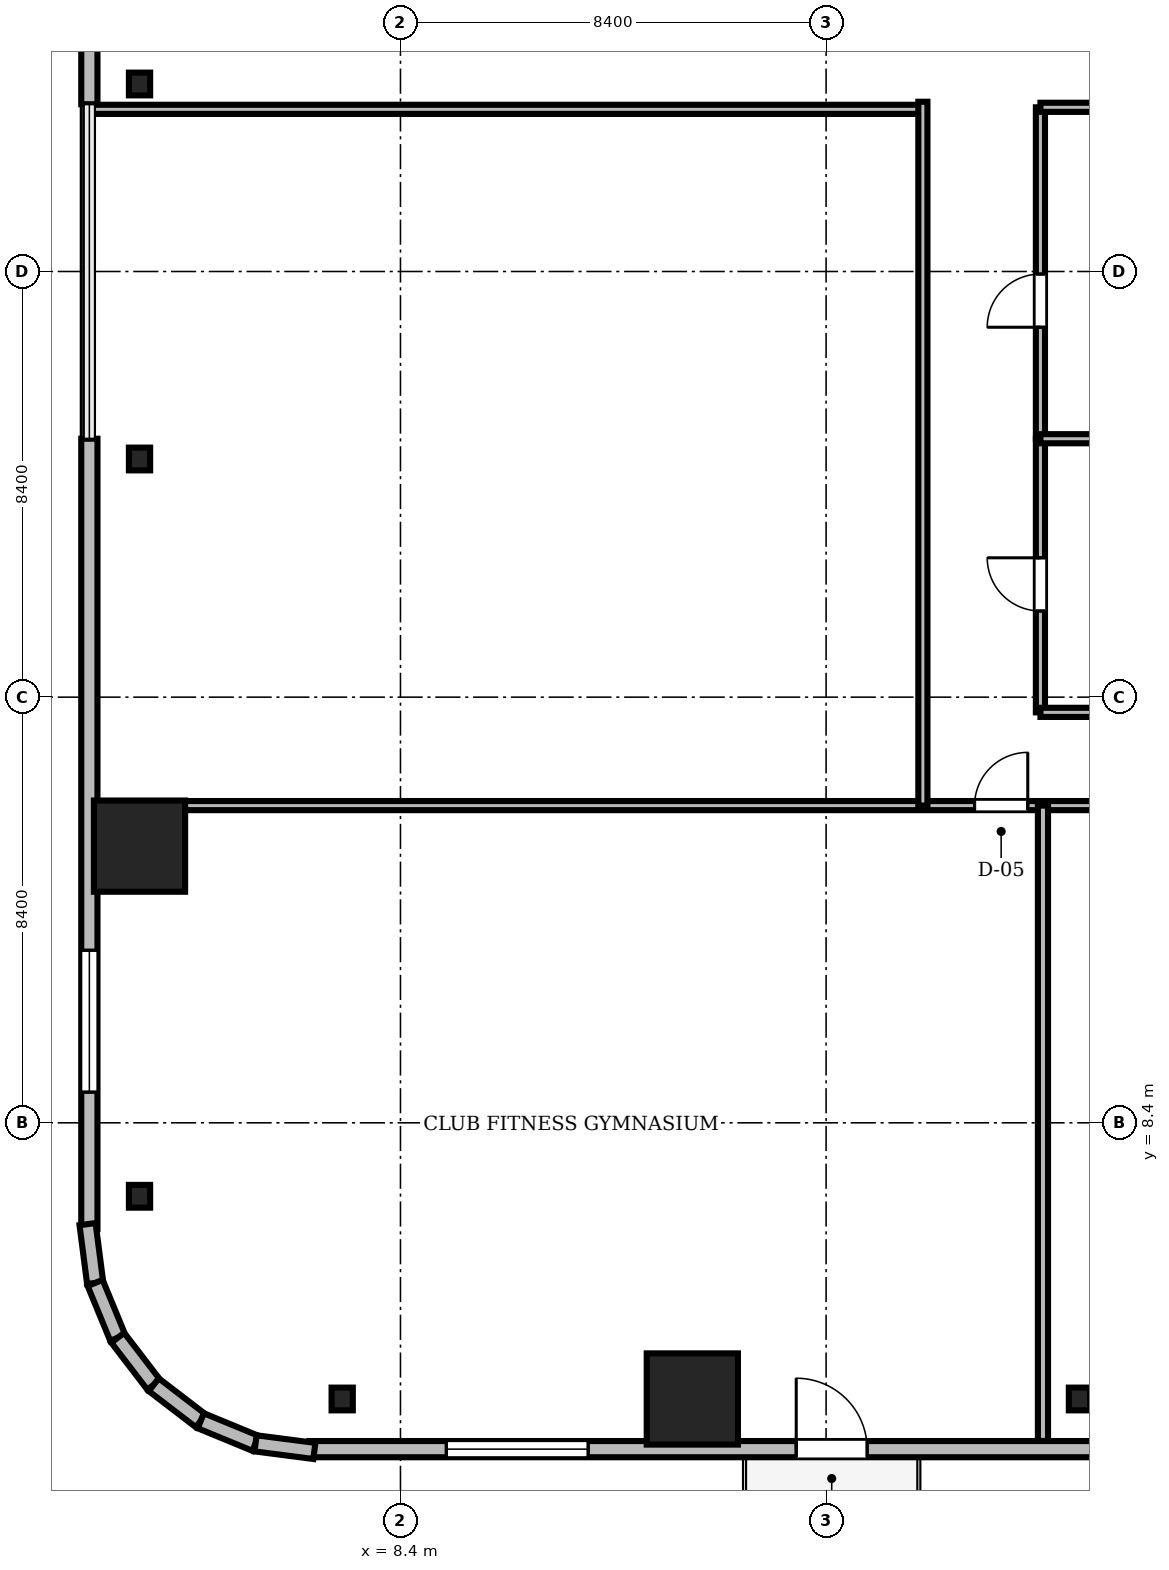
"""IFC4 building model, lengths in metres.
Left out: names, types, materials, properties, quantities, classifications, styles, units other than length and angle.
Written with IfcOpenShell. Run it as: python <this file> out.ifc"""

import sys

from ifc_helpers import new_model, si_unit, direction, frame, frame_2d, origin, origin_2d, place, context, subcontext, project, spatial, rectangle, i_section, extrude, source, transform, mapped, element, fill, save


model = new_model("IFC4")
c1 = context("Model", 3, precision=1e-05, world=origin(), true_north=direction((0.0, 1.0)))
c2 = subcontext(c1, "Body", "Model", "MODEL_VIEW")
j1 = project(units=[si_unit("LENGTHUNIT", "METRE"), si_unit("PLANEANGLEUNIT", "RADIAN")], contexts=[c1])
p1 = place(None, origin())
s1 = spatial("IfcSite", under=j1, at=p1, CompositionType="ELEMENT")
p2 = place(p1, origin())
s2 = spatial("IfcBuilding", under=s1, at=p2, CompositionType="ELEMENT")
p3 = place(p2, frame((0.0, 0.0, 64.1)))
s3 = spatial("IfcBuildingStorey", under=s2, at=p3, CompositionType="ELEMENT", Elevation=64.1)
m1 = source(origin(), c2, "Body", "SweptSolid", [
    extrude(rectangle(XDim=1.8, YDim=1.8, at=origin_2d()), origin(), (0.0, 0.0, 1.0), 3.41),
])
for number, where, z_axis, x_axis in (
    (1, (14.16, 2.95, 0.0), (0.0, 0.0, 1.0), (1.0, 0.0, 0.0)),
    (2, (3.25, 13.86, 0.0), (0.0, 0.0, 1.0), (1.0, 0.0, 0.0)),
):
    element("IfcColumn", number, at=place(p3, frame(where, z_axis=z_axis, x_axis=x_axis)), inside=s3, PredefinedType="COLUMN", context=c2, shape_type="MappedRepresentation", body=[
        mapped(m1, transform((0.0, 0.0, 0.0), scale=1.0)),
    ])
m2 = source(origin(), c2, "Body", "SweptSolid", [
    extrude(i_section(OverallWidth=0.419, OverallDepth=0.449, WebThickness=0.031, FlangeThickness=0.048, FilletRadius=0.015, at=origin_2d()), origin(), (0.0, 0.0, 1.0), 3.41),
])
for number, where, z_axis, x_axis in (
    (3, (7.25, 2.95, 0.0), (0.0, 0.0, 1.0), (1.0, 0.0, 0.0)),
    (4, (21.8, 2.95, 0.0), (0.0, 0.0, 1.0), (1.0, 0.0, 0.0)),
    (5, (3.25, 28.9, 0.0), (0.0, 0.0, 1.0), (1.0, 0.0, 0.0)),
    (6, (3.25, 21.5, 0.0), (0.0, 0.0, 1.0), (1.0, 0.0, 0.0)),
    (7, (3.25, 6.95, 0.0), (0.0, 0.0, 1.0), (1.0, 0.0, 0.0)),
):
    element("IfcColumn", number, at=place(p3, frame(where, z_axis=z_axis, x_axis=x_axis)), inside=s3, PredefinedType="COLUMN", context=c2, shape_type="MappedRepresentation", body=[
        mapped(m2, transform((0.0, 0.0, 0.0), scale=1.0)),
    ])
m3 = source(origin(), c2, "Body", "SweptSolid", [
    extrude(rectangle(XDim=15.6, YDim=0.32, at=frame_2d((7.8, 0.0))), origin(), (0.0, 0.0, 1.0), 3.41),
])
p4 = place(p3, frame((6.6, 1.96, 0.0), z_axis=(0.0, 0.0, 1.0), x_axis=(1.0, 0.0, 0.0)))
e8 = element("IfcWall", 8, at=p4, inside=s3, PredefinedType="SOLIDWALL", context=c2, shape_type="MappedRepresentation", body=[
    mapped(m3, transform((0.0, 0.0, 0.0), scale=1.0)),
])
m4 = source(origin(), c2, "Body", "SweptSolid", [
    extrude(rectangle(XDim=1.4, YDim=2.3, at=frame_2d((0.7, 1.15))), frame((0.0, 0.17, 0.0), z_axis=(0.0, -1.0, 0.0), x_axis=(1.0, 0.0, 0.0)), (0.0, 0.0, 1.0), 0.34),
])
p5 = place(p4, frame((9.61, 0.0, 0.0)))
e9 = element("IfcOpeningElement", 9, at=p5, cuts=e8, PredefinedType="OPENING", context=c2, shape_type="MappedRepresentation", body=[
    mapped(m4, transform((0.0, 0.0, 0.0), scale=1.0)),
])
m5 = source(origin(), c2, "Body", "SweptSolid", [
    extrude(rectangle(XDim=2.8, YDim=2.4, at=frame_2d((1.4, 1.2))), frame((0.0, 0.17, 0.0), z_axis=(0.0, -1.0, 0.0), x_axis=(1.0, 0.0, 0.0)), (0.0, 0.0, 1.0), 0.34),
])
p6 = place(p4, frame((2.705, 0.0, 0.72)))
e10 = element("IfcOpeningElement", 10, at=p6, cuts=e8, PredefinedType="OPENING", context=c2, shape_type="MappedRepresentation", body=[
    mapped(m5, transform((0.0, 0.0, 0.0), scale=1.0)),
])
m6 = source(origin(), c2, "Body", "SweptSolid", [
    extrude(rectangle(XDim=15.6, YDim=0.32, at=frame_2d((7.8, 0.0))), origin(), (0.0, 0.0, 1.0), 3.41),
])
p7 = place(p3, frame((2.26, 44.1, 0.0), z_axis=(0.0, 0.0, 1.0), x_axis=(0.0, -1.0, 0.0)))
e11 = element("IfcWall", 11, at=p7, inside=s3, PredefinedType="SOLIDWALL", context=c2, shape_type="MappedRepresentation", body=[
    mapped(m6, transform((0.0, 0.0, 0.0), scale=1.0)),
])
p8 = place(p7, frame((9.61, 0.0, 0.0)))
e12 = element("IfcOpeningElement", 12, at=p8, cuts=e11, PredefinedType="OPENING", context=c2, shape_type="MappedRepresentation", body=[
    mapped(m4, transform((0.0, 0.0, 0.0), scale=1.0)),
])
p9 = place(p7, frame((2.705, 0.0, 0.72)))
e13 = element("IfcOpeningElement", 13, at=p9, cuts=e11, PredefinedType="OPENING", context=c2, shape_type="MappedRepresentation", body=[
    mapped(m5, transform((0.0, 0.0, 0.0), scale=1.0)),
])
p10 = place(p3, frame((2.26, 21.9, 0.0), z_axis=(0.0, 0.0, 1.0), x_axis=(0.0, -1.0, 0.0)))
e14 = element("IfcWall", 14, at=p10, inside=s3, PredefinedType="SOLIDWALL", context=c2, shape_type="MappedRepresentation", body=[
    mapped(m3, transform((0.0, 0.0, 0.0), scale=1.0)),
])
p11 = place(p10, frame((10.095, 0.0, 0.72)))
e15 = element("IfcOpeningElement", 15, at=p11, cuts=e14, PredefinedType="OPENING", context=c2, shape_type="MappedRepresentation", body=[
    mapped(m5, transform((0.0, 0.0, 0.0), scale=1.0)),
])
m7 = source(origin(), c2, "Body", "SweptSolid", [
    extrude(rectangle(XDim=1.171, YDim=0.32, at=frame_2d((0.585, 0.0))), origin(), (0.0, 0.0, 1.0), 3.41),
])
p12 = place(p3, frame((2.224, 6.401, 0.0), z_axis=(0.0, 0.0, 1.0), x_axis=(0.128269133229, -0.991739395941, 0.0)))
e16 = element("IfcWall", 16, at=p12, inside=s3, PredefinedType="SOLIDWALL", context=c2, shape_type="MappedRepresentation", body=[
    mapped(m7, transform((0.0, 0.0, 0.0), scale=1.0)),
])
m8 = source(origin(), c2, "Body", "SweptSolid", [
    extrude(rectangle(XDim=1.169, YDim=0.32, at=frame_2d((0.584, 0.0))), origin(), (0.0, 0.0, 1.0), 3.41),
])
for number, where, z_axis, x_axis in (
    (17, (2.375, 5.24, 0.0), (0.0, 0.0, 1.0), (0.381, -0.925, 0.0)),
    (18, (2.82, 4.159, 0.0), (0.0, 0.0, 1.0), (0.608, -0.794, 0.0)),
):
    element("IfcWall", number, at=place(p3, frame(where, z_axis=z_axis, x_axis=x_axis)), inside=s3, PredefinedType="SOLIDWALL", context=c2, shape_type="MappedRepresentation", body=[
        mapped(m8, transform((0.0, 0.0, 0.0), scale=1.0)),
    ])
m9 = source(origin(), c2, "Body", "SweptSolid", [
    extrude(rectangle(XDim=1.169, YDim=0.32, at=frame_2d((0.584, 0.0))), origin(), (0.0, 0.0, 1.0), 3.41),
])
p13 = place(p3, frame((3.531, 3.231, 0.0), z_axis=(0.0, 0.0, 1.0), x_axis=(0.793663520347, -0.608356981114, 0.0)))
e19 = element("IfcWall", 19, at=p13, inside=s3, PredefinedType="SOLIDWALL", context=c2, shape_type="MappedRepresentation", body=[
    mapped(m9, transform((0.0, 0.0, 0.0), scale=1.0)),
])
m10 = source(origin(), c2, "Body", "SweptSolid", [
    extrude(rectangle(XDim=1.169, YDim=0.32, at=frame_2d((0.585, 0.0))), origin(), (0.0, 0.0, 1.0), 3.41),
])
p14 = place(p3, frame((4.459, 2.52, 0.0), z_axis=(0.0, 0.0, 1.0), x_axis=(0.924479075121, -0.381232789334, 0.0)))
e20 = element("IfcWall", 20, at=p14, inside=s3, PredefinedType="SOLIDWALL", context=c2, shape_type="MappedRepresentation", body=[
    mapped(m10, transform((0.0, 0.0, 0.0), scale=1.0)),
])
m11 = source(origin(), c2, "Body", "SweptSolid", [
    extrude(rectangle(XDim=1.17, YDim=0.32, at=frame_2d((0.585, 0.0))), origin(), (0.0, 0.0, 1.0), 3.41),
])
p15 = place(p3, frame((5.54, 2.074, 0.0), z_axis=(0.0, 0.0, 1.0), x_axis=(0.991762485493, -0.128090485085, 0.0)))
e21 = element("IfcWall", 21, at=p15, inside=s3, PredefinedType="SOLIDWALL", context=c2, shape_type="MappedRepresentation", body=[
    mapped(m11, transform((0.0, 0.0, 0.0), scale=1.0)),
])
m12 = source(origin(), c2, "Body", "SweptSolid", [
    extrude(rectangle(XDim=46.156, YDim=0.18, at=frame_2d((23.078, 0.0))), origin(), (0.0, 0.0, 1.0), 2.652),
])
p16 = place(p3, frame((2.422, 14.66, 0.0), z_axis=(0.0, 0.0, 1.0), x_axis=(1.0, 0.0, 0.0)))
e22 = element("IfcWall", 22, at=p16, inside=s3, PredefinedType="PARTITIONING", context=c2, shape_type="MappedRepresentation", body=[
    mapped(m12, transform((0.0, 0.0, 0.0), scale=1.0)),
])
m13 = source(origin(), c2, "Body", "SweptSolid", [
    extrude(rectangle(XDim=1.05, YDim=2.2, at=frame_2d((0.525, 1.1))), frame((0.0, 0.1, 0.0), z_axis=(0.0, -1.0, 0.0), x_axis=(1.0, 0.0, 0.0)), (0.0, 0.0, 1.0), 0.2),
])
p17 = place(p16, frame((17.308, 0.0, 0.0)))
e23 = element("IfcOpeningElement", 23, at=p17, cuts=e22, PredefinedType="OPENING", context=c2, shape_type="MappedRepresentation", body=[
    mapped(m13, transform((0.0, 0.0, 0.0), scale=1.0)),
])
p18 = place(p16, frame((19.947, 0.0, 0.0)))
e24 = element("IfcOpeningElement", 24, at=p18, cuts=e22, PredefinedType="OPENING", context=c2, shape_type="MappedRepresentation", body=[
    mapped(m13, transform((0.0, 0.0, 0.0), scale=1.0)),
])
p19 = place(p16, frame((23.565, 0.0, 0.0)))
e25 = element("IfcOpeningElement", 25, at=p19, cuts=e22, PredefinedType="OPENING", context=c2, shape_type="MappedRepresentation", body=[
    mapped(m13, transform((0.0, 0.0, 0.0), scale=1.0)),
])
p20 = place(p16, frame((27.183, 0.0, 0.0)))
e26 = element("IfcOpeningElement", 26, at=p20, cuts=e22, PredefinedType="OPENING", context=c2, shape_type="MappedRepresentation", body=[
    mapped(m13, transform((0.0, 0.0, 0.0), scale=1.0)),
])
p21 = place(p16, frame((30.801, 0.0, 0.0)))
e27 = element("IfcOpeningElement", 27, at=p21, cuts=e22, PredefinedType="OPENING", context=c2, shape_type="MappedRepresentation", body=[
    mapped(m13, transform((0.0, 0.0, 0.0), scale=1.0)),
])
p22 = place(p16, frame((34.419, 0.0, 0.0)))
e28 = element("IfcOpeningElement", 28, at=p22, cuts=e22, PredefinedType="OPENING", context=c2, shape_type="MappedRepresentation", body=[
    mapped(m13, transform((0.0, 0.0, 0.0), scale=1.0)),
])
p23 = place(p16, frame((38.037, 0.0, 0.0)))
e29 = element("IfcOpeningElement", 29, at=p23, cuts=e22, PredefinedType="OPENING", context=c2, shape_type="MappedRepresentation", body=[
    mapped(m13, transform((0.0, 0.0, 0.0), scale=1.0)),
])
p24 = place(p16, frame((42.727, 0.0, 0.0)))
e30 = element("IfcOpeningElement", 30, at=p24, cuts=e22, PredefinedType="OPENING", context=c2, shape_type="MappedRepresentation", body=[
    mapped(m13, transform((0.0, 0.0, 0.0), scale=1.0)),
])
m14 = source(origin(), c2, "Body", "SweptSolid", [
    extrude(rectangle(XDim=6.54, YDim=0.18, at=frame_2d((3.27, 0.0))), origin(), (0.0, 0.0, 1.0), 2.802),
])
p25 = place(p3, frame((21.03, 21.9, 0.0), z_axis=(0.0, 0.0, 1.0), x_axis=(0.0, 1.0, 0.0)))
e31 = element("IfcWall", 31, at=p25, inside=s3, PredefinedType="PARTITIONING", context=c2, shape_type="MappedRepresentation", body=[
    mapped(m14, transform((0.0, 0.0, 0.0), scale=1.0)),
])
p26 = place(p25, frame((2.2, 0.0, 0.0)))
e32 = element("IfcOpeningElement", 32, at=p26, cuts=e31, PredefinedType="OPENING", context=c2, shape_type="MappedRepresentation", body=[
    mapped(m13, transform((0.0, 0.0, 0.0), scale=1.0)),
])
m15 = source(origin(), c2, "Body", "SweptSolid", [
    extrude(rectangle(XDim=5.4, YDim=0.18, at=frame_2d((2.7, 0.0))), origin(), (0.0, 0.0, 1.0), 2.802),
])
p27 = place(p3, frame((21.03, 16.5, 0.0), z_axis=(0.0, 0.0, 1.0), x_axis=(0.0, 1.0, 0.0)))
e33 = element("IfcWall", 33, at=p27, inside=s3, PredefinedType="PARTITIONING", context=c2, shape_type="MappedRepresentation", body=[
    mapped(m15, transform((0.0, 0.0, 0.0), scale=1.0)),
])
p28 = place(p27, frame((2.0, 0.0, 0.0)))
e34 = element("IfcOpeningElement", 34, at=p28, cuts=e33, PredefinedType="OPENING", context=c2, shape_type="MappedRepresentation", body=[
    mapped(m13, transform((0.0, 0.0, 0.0), scale=1.0)),
])
m16 = source(origin(), c2, "Body", "SweptSolid", [
    extrude(rectangle(XDim=16.48, YDim=0.18, at=frame_2d((8.24, 0.0))), origin(), (0.0, 0.0, 1.0), 2.652),
])
p29 = place(p3, frame((2.23, 28.4, 0.0), z_axis=(0.0, 0.0, 1.0), x_axis=(1.0, 0.0, 0.0)))
e35 = element("IfcWall", 35, at=p29, inside=s3, PredefinedType="PARTITIONING", context=c2, shape_type="MappedRepresentation", body=[
    mapped(m16, transform((0.0, 0.0, 0.0), scale=1.0)),
])
m17 = source(origin(), c2, "Body", "SweptSolid", [
    extrude(rectangle(XDim=13.89, YDim=0.18, at=frame_2d((6.945, 0.0))), origin(), (0.0, 0.0, 1.0), 2.802),
])
p30 = place(p3, frame((18.71, 14.66, 0.0), z_axis=(0.0, 0.0, 1.0), x_axis=(0.0, 1.0, 0.0)))
e36 = element("IfcWall", 36, at=p30, inside=s3, PredefinedType="PARTITIONING", context=c2, shape_type="MappedRepresentation", body=[
    mapped(m17, transform((0.0, 0.0, 0.0), scale=1.0)),
])
m18 = source(origin(), c2, "Body", "SweptSolid", [
    extrude(rectangle(XDim=12.538, YDim=0.2, at=frame_2d((6.269, 0.0))), origin(), (0.0, 0.0, 1.0), 2.652),
])
p31 = place(p3, frame((21.08, 2.122, 0.0), z_axis=(0.0, 0.0, 1.0), x_axis=(0.0, 1.0, 0.0)))
e37 = element("IfcWall", 37, at=p31, inside=s3, PredefinedType="PARTITIONING", context=c2, shape_type="MappedRepresentation", body=[
    mapped(m18, transform((0.0, 0.0, 0.0), scale=1.0)),
])
m19 = source(origin(), c2, "Body", "SweptSolid", [
    extrude(rectangle(XDim=7.37, YDim=0.18, at=frame_2d((3.685, 0.0))), origin(), (0.0, 0.0, 1.0), 2.802),
])
p32 = place(p3, frame((21.03, 16.5, 0.0), z_axis=(0.0, 0.0, 1.0), x_axis=(1.0, 0.0, 0.0)))
e38 = element("IfcWall", 38, at=p32, inside=s3, PredefinedType="PARTITIONING", context=c2, shape_type="MappedRepresentation", body=[
    mapped(m19, transform((0.0, 0.0, 0.0), scale=1.0)),
])
m20 = source(origin(), c2, "Body", "SweptSolid", [
    extrude(rectangle(XDim=7.37, YDim=0.18, at=frame_2d((3.685, 0.0))), origin(), (0.0, 0.0, 1.0), 3.41),
])
for number, where, z_axis, x_axis in (
    (39, (21.03, 21.9, 0.0), (0.0, 0.0, 1.0), (1.0, 0.0, 0.0)),
    (40, (21.03, 28.44, 0.0), (0.0, 0.0, 1.0), (1.0, 0.0, 0.0)),
):
    element("IfcWall", number, at=place(p3, frame(where, z_axis=z_axis, x_axis=x_axis)), inside=s3, PredefinedType="PARTITIONING", context=c2, shape_type="MappedRepresentation", body=[
        mapped(m20, transform((0.0, 0.0, 0.0), scale=1.0)),
    ])
m21 = source(origin(), c2, "Body", "SweptSolid", [
    extrude(rectangle(XDim=1.4, YDim=2.3, at=frame_2d((0.7, 1.15))), frame((0.0, 0.025, 0.0), z_axis=(0.0, -1.0, 0.0), x_axis=(1.0, 0.0, 0.0)), (0.0, 0.0, 1.0), 0.05),
])
p33 = place(p5, frame((1.4, 0.0, 0.0), z_axis=(0.0, 0.0, 1.0), x_axis=(-1.0, 0.0, 0.0)))
e41 = element("IfcDoor", 41, at=p33, inside=s3, OperationType="DOUBLE_DOOR_SLIDING", PredefinedType="DOOR", context=c2, shape_type="MappedRepresentation", body=[
    mapped(m21, transform((0.0, 0.0, 0.0), scale=1.0)),
])
fill(e9, e41)
m22 = source(origin(), c2, "Body", "SweptSolid", [
    extrude(rectangle(XDim=2.8, YDim=2.4, at=frame_2d((1.4, 1.2))), frame((0.0, 0.03, 0.0), z_axis=(0.0, -1.0, 0.0), x_axis=(1.0, 0.0, 0.0)), (0.0, 0.0, 1.0), 0.06),
])
p34 = place(p6, origin())
e42 = element("IfcWindow", 42, at=p34, inside=s3, PartitioningType="SINGLE_PANEL", PredefinedType="WINDOW", context=c2, shape_type="MappedRepresentation", body=[
    mapped(m22, transform((0.0, 0.0, 0.0), scale=1.0)),
])
fill(e10, e42)
p35 = place(p11, origin())
e43 = element("IfcWindow", 43, at=p35, inside=s3, PartitioningType="SINGLE_PANEL", PredefinedType="WINDOW", context=c2, shape_type="MappedRepresentation", body=[
    mapped(m22, transform((0.0, 0.0, 0.0), scale=1.0)),
])
fill(e15, e43)
m23 = source(origin(), c2, "Body", "SweptSolid", [
    extrude(rectangle(XDim=1.05, YDim=2.2, at=frame_2d((0.525, 1.1))), frame((0.0, 0.025, 0.0), z_axis=(0.0, -1.0, 0.0), x_axis=(1.0, 0.0, 0.0)), (0.0, 0.0, 1.0), 0.05),
])
p36 = place(p17, origin())
e44 = element("IfcDoor", 44, at=p36, inside=s3, OperationType="SINGLE_SWING_RIGHT", PredefinedType="DOOR", context=c2, shape_type="MappedRepresentation", body=[
    mapped(m23, transform((0.0, 0.0, 0.0), scale=1.0)),
])
fill(e23, e44)
p37 = place(p26, origin())
e45 = element("IfcDoor", 45, at=p37, inside=s3, OperationType="SINGLE_SWING_LEFT", PredefinedType="DOOR", context=c2, shape_type="MappedRepresentation", body=[
    mapped(m23, transform((0.0, 0.0, 0.0), scale=1.0)),
])
fill(e32, e45)
p38 = place(p28, origin())
e46 = element("IfcDoor", 46, at=p38, inside=s3, OperationType="SINGLE_SWING_RIGHT", PredefinedType="DOOR", context=c2, shape_type="MappedRepresentation", body=[
    mapped(m23, transform((0.0, 0.0, 0.0), scale=1.0)),
])
fill(e34, e46)
save(model, sys.argv[1])
